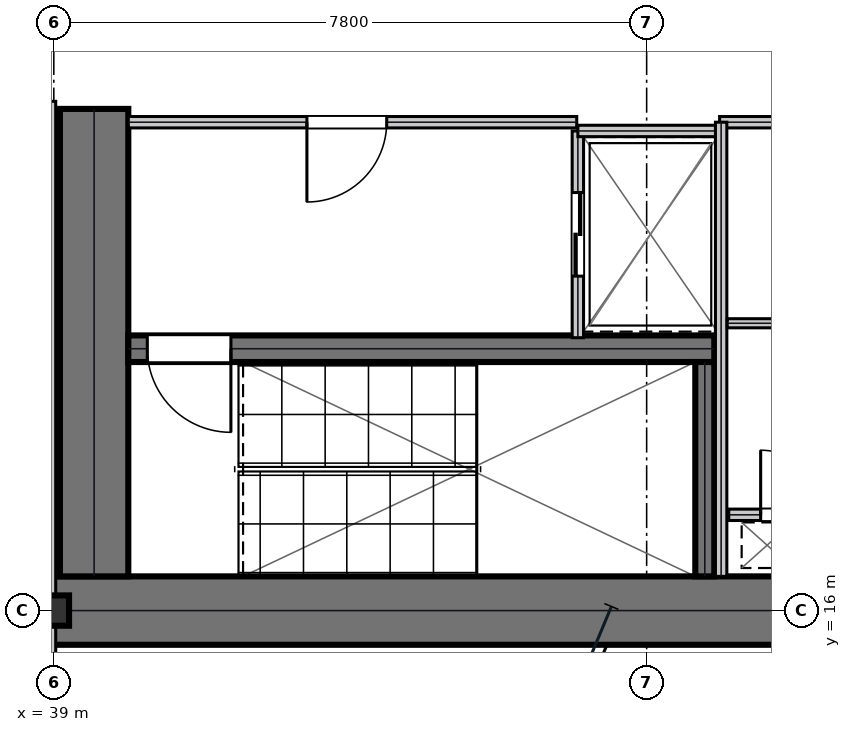
"""IFC4 building model, lengths in metres.
Left out: names, types, materials, properties, quantities, classifications, styles, units other than length and angle.
Written with IfcOpenShell. Run it as: python <this file> out.ifc"""

import sys

from ifc_helpers import new_model, si_unit, direction, frame, frame_2d, origin, origin_2d, place, context, subcontext, project, spatial, rectangle, i_section, extrude, element, fill, save


model = new_model("IFC4")
c1 = context("Model", 3, precision=1e-05, world=origin(), true_north=direction((0.0, 1.0)))
c2 = subcontext(c1, "Body", "Model", "MODEL_VIEW")
j1 = project(units=[si_unit("LENGTHUNIT", "METRE"), si_unit("PLANEANGLEUNIT", "RADIAN")], contexts=[c1])
p1 = place(None, origin())
s1 = spatial("IfcSite", under=j1, at=p1, CompositionType="ELEMENT")
p2 = place(p1, origin())
s2 = spatial("IfcBuilding", under=s1, at=p2, CompositionType="ELEMENT")
p3 = place(p2, frame((0.0, 0.0, 78.3)))
s3 = spatial("IfcBuildingStorey", under=s2, at=p3, CompositionType="ELEMENT", Elevation=78.3)
p4 = place(p3, frame((38.8, 16.0, 0.0), z_axis=(0.0, 0.0, 1.0), x_axis=(1.0, 0.0, 0.0)))
e1 = element("IfcWall", 1, at=p4, inside=s3, PredefinedType="SHEAR", context=c2, shape_type="SweptSolid", body=[
    extrude(rectangle(XDim=16.0, YDim=0.9, at=frame_2d((8.0, 0.0))), origin(), (0.0, 0.0, 1.0), 3.81),
])
p5 = place(p3, frame((39.53, 16.45, 0.0), z_axis=(0.0, 0.0, 1.0), x_axis=(0.0, 1.0, 0.0)))
e2 = element("IfcWall", 2, at=p5, inside=s3, PredefinedType="SHEAR", context=c2, shape_type="SweptSolid", body=[
    extrude(rectangle(XDim=6.15, YDim=0.9, at=frame_2d((3.075, 0.0))), origin(), (0.0, 0.0, 1.0), 3.81),
])
p6 = place(p3, frame((39.98, 19.445, 0.0), z_axis=(0.0, 0.0, 1.0), x_axis=(1.0, 0.0, 0.0)))
e3 = element("IfcWall", 3, at=p6, inside=s3, PredefinedType="SHEAR", context=c2, shape_type="SweptSolid", body=[
    extrude(rectangle(XDim=7.71, YDim=0.35, at=frame_2d((3.855, 0.0))), origin(), (0.0, 0.0, 1.0), 3.81),
])
p7 = place(p6, frame((0.25, 0.0, 0.0)))
e4 = element("IfcOpeningElement", 4, at=p7, cuts=e3, PredefinedType="OPENING", context=c2, shape_type="SweptSolid", body=[
    extrude(rectangle(XDim=1.1, YDim=2.15, at=frame_2d((0.55, 1.075))), frame((0.0, 0.185, 0.0), z_axis=(0.0, -1.0, 0.0), x_axis=(1.0, 0.0, 0.0)), (0.0, 0.0, 1.0), 0.37),
])
p8 = place(p3, frame((47.565, 16.45, 0.0), z_axis=(0.0, 0.0, 1.0), x_axis=(0.0, 1.0, 0.0)))
e5 = element("IfcWall", 5, at=p8, inside=s3, PredefinedType="SHEAR", context=c2, shape_type="SweptSolid", body=[
    extrude(rectangle(XDim=2.82, YDim=0.25, at=frame_2d((1.41, 0.0))), origin(), (0.0, 0.0, 1.0), 3.81),
])
p9 = place(p3, frame((39.0, 16.0, 0.0), z_axis=(0.0, 0.0, 1.0), x_axis=(1.0, 0.0, 0.0)))
e6 = element("IfcColumn", 6, at=p9, inside=s3, PredefinedType="COLUMN", context=c2, shape_type="SweptSolid", body=[
    extrude(i_section(OverallWidth=0.401, OverallDepth=0.399, WebThickness=0.025, FlangeThickness=0.04, at=origin_2d()), origin(), (0.0, 0.0, 1.0), 4.044),
])
p10 = place(p3, frame((39.98, 22.425, 0.0), z_axis=(0.0, 0.0, 1.0), x_axis=(1.0, 0.0, 0.0)))
e7 = element("IfcWall", 7, at=p10, inside=s3, PredefinedType="PARTITIONING", context=c2, shape_type="SweptSolid", body=[
    extrude(rectangle(XDim=5.9, YDim=0.15, at=frame_2d((2.95, 0.0))), origin(), (0.0, 0.0, 1.0), 3.81),
])
p11 = place(p10, frame((2.35, 0.0, 0.0)))
e8 = element("IfcOpeningElement", 8, at=p11, cuts=e7, PredefinedType="OPENING", context=c2, shape_type="SweptSolid", body=[
    extrude(rectangle(XDim=1.05, YDim=2.15, at=frame_2d((0.525, 1.075))), frame((0.0, 0.085, 0.0), z_axis=(0.0, -1.0, 0.0), x_axis=(1.0, 0.0, 0.0)), (0.0, 0.0, 1.0), 0.17),
])
p12 = place(p3, frame((45.895, 19.59, 0.0), z_axis=(0.0, 0.0, 1.0), x_axis=(0.0, 1.0, 0.0)))
e9 = element("IfcWall", 9, at=p12, inside=s3, PredefinedType="PARTITIONING", context=c2, shape_type="SweptSolid", body=[
    extrude(rectangle(XDim=2.72, YDim=0.15, at=frame_2d((1.36, 0.0))), origin(), (0.0, 0.0, 1.0), 3.81),
])
p13 = place(p12, frame((0.81, 0.0, 0.0)))
e10 = element("IfcOpeningElement", 10, at=p13, cuts=e9, PredefinedType="OPENING", context=c2, shape_type="SweptSolid", body=[
    extrude(rectangle(XDim=1.1, YDim=2.15, at=frame_2d((0.55, 1.075))), frame((0.0, 0.085, 0.0), z_axis=(0.0, -1.0, 0.0), x_axis=(1.0, 0.0, 0.0)), (0.0, 0.0, 1.0), 0.17),
])
p14 = place(p3, frame((45.895, 22.31, 0.0), z_axis=(0.0, 0.0, 1.0), x_axis=(1.0, 0.0, 0.0)))
e11 = element("IfcWall", 11, at=p14, inside=s3, PredefinedType="PARTITIONING", context=c2, shape_type="SweptSolid", body=[
    extrude(rectangle(XDim=1.915, YDim=0.15, at=frame_2d((0.958, 0.0))), origin(), (0.0, 0.0, 1.0), 3.81),
])
p15 = place(p3, frame((47.88, 17.26, 0.0), z_axis=(0.0, 0.0, 1.0), x_axis=(1.0, 0.0, 0.0)))
e12 = element("IfcWall", 12, at=p15, inside=s3, PredefinedType="PARTITIONING", context=c2, shape_type="SweptSolid", body=[
    extrude(rectangle(XDim=1.72, YDim=0.15, at=frame_2d((0.86, 0.0))), origin(), (0.0, 0.0, 1.0), 3.81),
])
p16 = place(p15, frame((0.42, 0.0, 0.0)))
e13 = element("IfcOpeningElement", 13, at=p16, cuts=e12, PredefinedType="OPENING", context=c2, shape_type="SweptSolid", body=[
    extrude(rectangle(XDim=0.85, YDim=2.15, at=frame_2d((0.425, 1.075))), frame((0.0, 0.085, 0.0), z_axis=(0.0, -1.0, 0.0), x_axis=(1.0, 0.0, 0.0)), (0.0, 0.0, 1.0), 0.17),
])
p17 = place(p3, frame((47.76, 22.425, 0.0), z_axis=(0.0, 0.0, 1.0), x_axis=(1.0, 0.0, 0.0)))
e14 = element("IfcWall", 14, at=p17, inside=s3, PredefinedType="PARTITIONING", context=c2, shape_type="SweptSolid", body=[
    extrude(rectangle(XDim=1.96, YDim=0.15, at=frame_2d((0.98, 0.0))), origin(), (0.0, 0.0, 1.0), 3.81),
])
p18 = place(p3, frame((47.78, 16.45, 0.0), z_axis=(0.0, 0.0, 1.0), x_axis=(0.0, 1.0, 0.0)))
e15 = element("IfcWall", 15, at=p18, inside=s3, PredefinedType="PARTITIONING", context=c2, shape_type="SweptSolid", body=[
    extrude(rectangle(XDim=5.975, YDim=0.15, at=frame_2d((2.988, 0.0))), origin(), (0.0, 0.0, 1.0), 3.81),
])
p19 = place(p3, frame((47.86, 19.78, 0.0), z_axis=(0.0, 0.0, 1.0), x_axis=(1.0, 0.0, 0.0)))
e16 = element("IfcWall", 16, at=p19, inside=s3, PredefinedType="PARTITIONING", context=c2, shape_type="SweptSolid", body=[
    extrude(rectangle(XDim=1.76, YDim=0.12, at=frame_2d((0.88, 0.0))), origin(), (0.0, 0.0, 1.0), 3.81),
])
p20 = place(p3, frame((38.95, 14.5, 0.0), z_axis=(0.0, 0.0, 1.0), x_axis=(0.0, 1.0, 0.0)))
e17 = element("IfcWall", 17, at=p20, inside=s3, PredefinedType="PARTITIONING", context=c2, shape_type="SweptSolid", body=[
    extrude(rectangle(XDim=8.2, YDim=0.15, at=frame_2d((4.1, 0.0))), origin(), (0.0, 0.0, 1.0), 3.181),
])
p21 = place(p11, frame((1.05, 0.0, 0.0), z_axis=(0.0, 0.0, 1.0), x_axis=(-1.0, 0.0, 0.0)))
e18 = element("IfcDoor", 18, at=p21, inside=s3, OperationType="SINGLE_SWING_RIGHT", PredefinedType="DOOR", context=c2, shape_type="SweptSolid", body=[
    extrude(rectangle(XDim=1.05, YDim=2.15, at=frame_2d((0.525, 1.075))), frame((0.0, 0.025, 0.0), z_axis=(0.0, -1.0, 0.0), x_axis=(1.0, 0.0, 0.0)), (0.0, 0.0, 1.0), 0.05),
])
fill(e8, e18)
p22 = place(p13, frame((1.1, 0.0, 0.0), z_axis=(0.0, 0.0, 1.0), x_axis=(-1.0, 0.0, 0.0)))
e19 = element("IfcDoor", 19, at=p22, inside=s3, OperationType="DOUBLE_DOOR_SLIDING", PredefinedType="DOOR", context=c2, shape_type="SweptSolid", body=[
    extrude(rectangle(XDim=1.1, YDim=2.15, at=frame_2d((0.55, 1.075))), frame((0.0, 0.025, 0.0), z_axis=(0.0, -1.0, 0.0), x_axis=(1.0, 0.0, 0.0)), (0.0, 0.0, 1.0), 0.05),
])
fill(e10, e19)
p23 = place(p16, origin())
e20 = element("IfcDoor", 20, at=p23, inside=s3, OperationType="SINGLE_SWING_LEFT", PredefinedType="TRAPDOOR", context=c2, shape_type="SweptSolid", body=[
    extrude(rectangle(XDim=0.85, YDim=2.15, at=frame_2d((0.425, 1.075))), frame((0.0, 0.025, 0.0), z_axis=(0.0, -1.0, 0.0), x_axis=(1.0, 0.0, 0.0)), (0.0, 0.0, 1.0), 0.05),
])
fill(e13, e20)
p24 = place(p7, frame((1.1, 0.0, 0.0), z_axis=(0.0, 0.0, 1.0), x_axis=(-1.0, 0.0, 0.0)))
e21 = element("IfcDoor", 21, at=p24, inside=s3, OperationType="SINGLE_SWING_LEFT", PredefinedType="DOOR", context=c2, shape_type="SweptSolid", body=[
    extrude(rectangle(XDim=1.1, YDim=2.15, at=frame_2d((0.55, 1.075))), frame((0.0, 0.025, 0.0), z_axis=(0.0, -1.0, 0.0), x_axis=(1.0, 0.0, 0.0)), (0.0, 0.0, 1.0), 0.05),
])
fill(e4, e21)
save(model, sys.argv[1])
